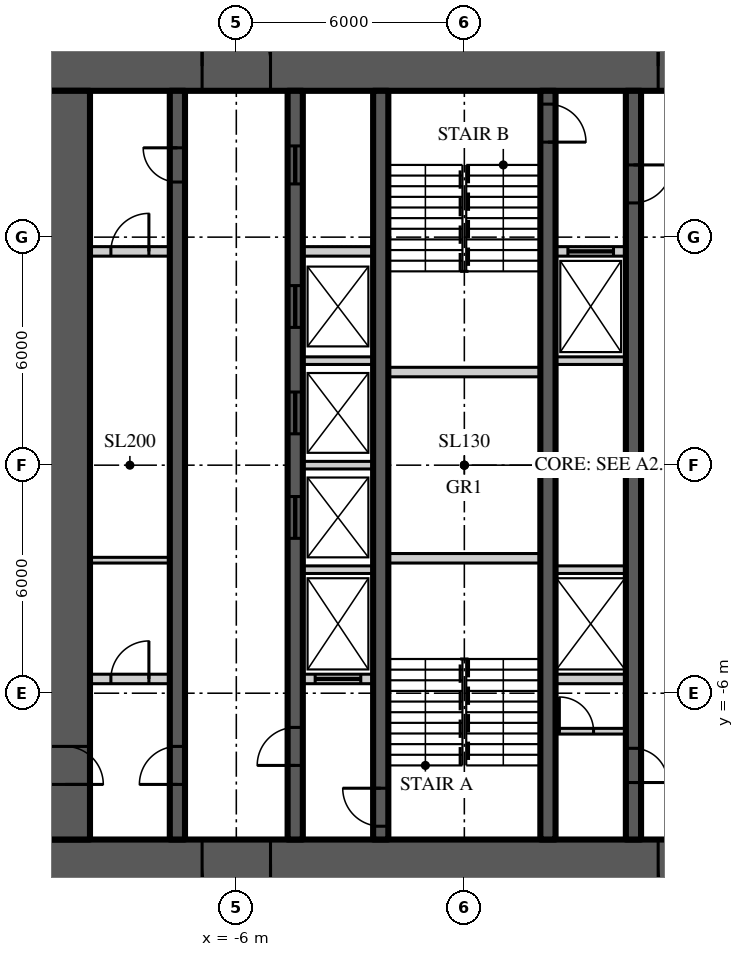
"""IFC4 building model, lengths in metres.
Left out: names, types, materials, properties, quantities, classifications, styles, units other than length and angle.
Written with IfcOpenShell. Run it as: python <this file> out.ifc"""

import sys

from ifc_helpers import new_model, si_unit, direction, frame, frame_2d, origin, place, context, subcontext, project, spatial, rectangle, extrude, element, fill, save


model = new_model("IFC4")
c1 = context("Model", 3, precision=1e-05, world=origin(), true_north=direction((0.0, 1.0)))
c2 = subcontext(c1, "Body", "Model", "MODEL_VIEW")
j1 = project(units=[si_unit("LENGTHUNIT", "METRE"), si_unit("PLANEANGLEUNIT", "RADIAN")], contexts=[c1])
p1 = place(None, origin())
s1 = spatial("IfcSite", under=j1, at=p1, CompositionType="ELEMENT")
p2 = place(p1, origin())
s2 = spatial("IfcBuilding", under=s1, at=p2, CompositionType="ELEMENT")
p3 = place(p2, frame((0.0, 0.0, 124.2)))
s3 = spatial("IfcBuildingStorey", under=s2, at=p3, CompositionType="ELEMENT", Elevation=124.2)
p4 = place(p3, frame((-11.15, 10.5, 0.0), z_axis=(0.0, 0.0, 1.0), x_axis=(1.0, 0.0, 0.0)))
e1 = element("IfcWall", 1, at=p4, inside=s3, PredefinedType="SHEAR", context=c2, shape_type="SweptSolid", body=[
    extrude(rectangle(XDim=22.3, YDim=1.3, at=frame_2d((11.15, 0.0))), origin(), (0.0, 0.0, 1.0), 3.9),
])
p5 = place(p4, frame((4.25, 0.0, 0.0)))
e2 = element("IfcOpeningElement", 2, at=p5, cuts=e1, PredefinedType="OPENING", context=c2, shape_type="SweptSolid", body=[
    extrude(rectangle(XDim=1.8, YDim=2.2, at=frame_2d((0.9, 1.1))), frame((0.0, 0.66, 0.0), z_axis=(0.0, -1.0, 0.0), x_axis=(1.0, 0.0, 0.0)), (0.0, 0.0, 1.0), 1.32),
])
p6 = place(p4, frame((16.25, 0.0, 0.0)))
e3 = element("IfcOpeningElement", 3, at=p6, cuts=e1, PredefinedType="OPENING", context=c2, shape_type="SweptSolid", body=[
    extrude(rectangle(XDim=1.8, YDim=2.2, at=frame_2d((0.9, 1.1))), frame((0.0, 0.66, 0.0), z_axis=(0.0, -1.0, 0.0), x_axis=(1.0, 0.0, 0.0)), (0.0, 0.0, 1.0), 1.32),
])
p7 = place(p3, frame((11.15, -10.5, 0.0), z_axis=(0.0, 0.0, 1.0), x_axis=(-1.0, 0.0, 0.0)))
e4 = element("IfcWall", 4, at=p7, inside=s3, PredefinedType="SHEAR", context=c2, shape_type="SweptSolid", body=[
    extrude(rectangle(XDim=22.3, YDim=1.3, at=frame_2d((11.15, 0.0))), origin(), (0.0, 0.0, 1.0), 3.9),
])
p8 = place(p7, frame((16.25, 0.0, 0.0)))
e5 = element("IfcOpeningElement", 5, at=p8, cuts=e4, PredefinedType="OPENING", context=c2, shape_type="SweptSolid", body=[
    extrude(rectangle(XDim=1.8, YDim=2.2, at=frame_2d((0.9, 1.1))), frame((0.0, 0.66, 0.0), z_axis=(0.0, -1.0, 0.0), x_axis=(1.0, 0.0, 0.0)), (0.0, 0.0, 1.0), 1.32),
])
p9 = place(p7, frame((4.25, 0.0, 0.0)))
e6 = element("IfcOpeningElement", 6, at=p9, cuts=e4, PredefinedType="OPENING", context=c2, shape_type="SweptSolid", body=[
    extrude(rectangle(XDim=1.8, YDim=2.2, at=frame_2d((0.9, 1.1))), frame((0.0, 0.66, 0.0), z_axis=(0.0, -1.0, 0.0), x_axis=(1.0, 0.0, 0.0)), (0.0, 0.0, 1.0), 1.32),
])
p10 = place(p3, frame((-10.5, 9.85, 0.0), z_axis=(0.0, 0.0, 1.0), x_axis=(0.0, -1.0, 0.0)))
e7 = element("IfcWall", 7, at=p10, inside=s3, PredefinedType="SHEAR", context=c2, shape_type="SweptSolid", body=[
    extrude(rectangle(XDim=19.7, YDim=1.3, at=frame_2d((9.85, 0.0))), origin(), (0.0, 0.0, 1.0), 3.9),
])
p11 = place(p10, frame((17.25, 0.0, 0.0)))
e8 = element("IfcOpeningElement", 8, at=p11, cuts=e7, PredefinedType="OPENING", context=c2, shape_type="SweptSolid", body=[
    extrude(rectangle(XDim=1.0, YDim=2.2, at=frame_2d((0.5, 1.1))), frame((0.0, 0.66, 0.0), z_axis=(0.0, -1.0, 0.0), x_axis=(1.0, 0.0, 0.0)), (0.0, 0.0, 1.0), 1.32),
])
p12 = place(p3, frame((-7.55, -9.85, 0.0), z_axis=(0.0, 0.0, 1.0), x_axis=(0.0, 1.0, 0.0)))
e9 = element("IfcWall", 9, at=p12, inside=s3, PredefinedType="SHEAR", context=c2, shape_type="SweptSolid", body=[
    extrude(rectangle(XDim=19.7, YDim=0.4, at=frame_2d((9.85, 0.0))), origin(), (0.0, 0.0, 1.0), 3.9),
])
p13 = place(p12, frame((1.45, 0.0, 0.0)))
e10 = element("IfcOpeningElement", 10, at=p13, cuts=e9, PredefinedType="OPENING", context=c2, shape_type="SweptSolid", body=[
    extrude(rectangle(XDim=1.0, YDim=2.2, at=frame_2d((0.5, 1.1))), frame((0.0, 0.21, 0.0), z_axis=(0.0, -1.0, 0.0), x_axis=(1.0, 0.0, 0.0)), (0.0, 0.0, 1.0), 0.42),
])
p14 = place(p12, frame((17.3, 0.0, 0.0)))
e11 = element("IfcOpeningElement", 11, at=p14, cuts=e9, PredefinedType="OPENING", context=c2, shape_type="SweptSolid", body=[
    extrude(rectangle(XDim=0.9, YDim=2.1, at=frame_2d((0.45, 1.05))), frame((0.0, 0.21, 0.0), z_axis=(0.0, -1.0, 0.0), x_axis=(1.0, 0.0, 0.0)), (0.0, 0.0, 1.0), 0.42),
])
p15 = place(p3, frame((-4.45, -9.85, 0.0), z_axis=(0.0, 0.0, 1.0), x_axis=(0.0, 1.0, 0.0)))
e12 = element("IfcWall", 12, at=p15, inside=s3, PredefinedType="SHEAR", context=c2, shape_type="SweptSolid", body=[
    extrude(rectangle(XDim=19.7, YDim=0.4, at=frame_2d((9.85, 0.0))), origin(), (0.0, 0.0, 1.0), 3.9),
])
p16 = place(p15, frame((1.95, 0.0, 0.0)))
e13 = element("IfcOpeningElement", 13, at=p16, cuts=e12, PredefinedType="OPENING", context=c2, shape_type="SweptSolid", body=[
    extrude(rectangle(XDim=1.0, YDim=2.2, at=frame_2d((0.5, 1.1))), frame((0.0, 0.21, 0.0), z_axis=(0.0, -1.0, 0.0), x_axis=(1.0, 0.0, 0.0)), (0.0, 0.0, 1.0), 0.42),
])
p17 = place(p15, frame((17.25, 0.0, 0.0)))
e14 = element("IfcOpeningElement", 14, at=p17, cuts=e12, PredefinedType="OPENING", context=c2, shape_type="SweptSolid", body=[
    extrude(rectangle(XDim=1.0, YDim=2.1, at=frame_2d((0.5, 1.05))), frame((0.0, 0.21, 0.0), z_axis=(0.0, -1.0, 0.0), x_axis=(1.0, 0.0, 0.0)), (0.0, 0.0, 1.0), 0.42),
])
p18 = place(p15, frame((7.925, 0.0, 0.0)))
e15 = element("IfcOpeningElement", 15, at=p18, cuts=e12, PredefinedType="OPENING", context=c2, shape_type="SweptSolid", body=[
    extrude(rectangle(XDim=1.1, YDim=2.2, at=frame_2d((0.55, 1.1))), frame((0.0, 0.21, 0.0), z_axis=(0.0, -1.0, 0.0), x_axis=(1.0, 0.0, 0.0)), (0.0, 0.0, 1.0), 0.42),
])
p19 = place(p15, frame((10.675, 0.0, 0.0)))
e16 = element("IfcOpeningElement", 16, at=p19, cuts=e12, PredefinedType="OPENING", context=c2, shape_type="SweptSolid", body=[
    extrude(rectangle(XDim=1.1, YDim=2.2, at=frame_2d((0.55, 1.1))), frame((0.0, 0.21, 0.0), z_axis=(0.0, -1.0, 0.0), x_axis=(1.0, 0.0, 0.0)), (0.0, 0.0, 1.0), 0.42),
])
p20 = place(p15, frame((13.475, 0.0, 0.0)))
e17 = element("IfcOpeningElement", 17, at=p20, cuts=e12, PredefinedType="OPENING", context=c2, shape_type="SweptSolid", body=[
    extrude(rectangle(XDim=1.1, YDim=2.2, at=frame_2d((0.55, 1.1))), frame((0.0, 0.21, 0.0), z_axis=(0.0, -1.0, 0.0), x_axis=(1.0, 0.0, 0.0)), (0.0, 0.0, 1.0), 0.42),
])
p21 = place(p3, frame((4.45, 9.85, 0.0), z_axis=(0.0, 0.0, 1.0), x_axis=(0.0, -1.0, 0.0)))
e18 = element("IfcWall", 18, at=p21, inside=s3, PredefinedType="SHEAR", context=c2, shape_type="SweptSolid", body=[
    extrude(rectangle(XDim=19.7, YDim=0.4, at=frame_2d((9.85, 0.0))), origin(), (0.0, 0.0, 1.0), 3.9),
])
p22 = place(p21, frame((1.95, 0.0, 0.0)))
e19 = element("IfcOpeningElement", 19, at=p22, cuts=e18, PredefinedType="OPENING", context=c2, shape_type="SweptSolid", body=[
    extrude(rectangle(XDim=1.0, YDim=2.2, at=frame_2d((0.5, 1.1))), frame((0.0, 0.21, 0.0), z_axis=(0.0, -1.0, 0.0), x_axis=(1.0, 0.0, 0.0)), (0.0, 0.0, 1.0), 0.42),
])
p23 = place(p21, frame((17.3, 0.0, 0.0)))
e20 = element("IfcOpeningElement", 20, at=p23, cuts=e18, PredefinedType="OPENING", context=c2, shape_type="SweptSolid", body=[
    extrude(rectangle(XDim=0.9, YDim=2.1, at=frame_2d((0.45, 1.05))), frame((0.0, 0.21, 0.0), z_axis=(0.0, -1.0, 0.0), x_axis=(1.0, 0.0, 0.0)), (0.0, 0.0, 1.0), 0.42),
])
p24 = place(p3, frame((-2.2, -9.85, 0.0), z_axis=(0.0, 0.0, 1.0), x_axis=(0.0, 1.0, 0.0)))
e21 = element("IfcWall", 21, at=p24, inside=s3, PredefinedType="SHEAR", context=c2, shape_type="SweptSolid", body=[
    extrude(rectangle(XDim=19.7, YDim=0.4, at=frame_2d((9.85, 0.0))), origin(), (0.0, 0.0, 1.0), 3.9),
])
p25 = place(p24, frame((0.35, 0.0, 0.0)))
e22 = element("IfcOpeningElement", 22, at=p25, cuts=e21, PredefinedType="OPENING", context=c2, shape_type="SweptSolid", body=[
    extrude(rectangle(XDim=1.0, YDim=2.2, at=frame_2d((0.5, 1.1))), frame((0.0, 0.21, 0.0), z_axis=(0.0, -1.0, 0.0), x_axis=(1.0, 0.0, 0.0)), (0.0, 0.0, 1.0), 0.42),
])
p26 = place(p3, frame((2.2, 9.85, 0.0), z_axis=(0.0, 0.0, 1.0), x_axis=(0.0, -1.0, 0.0)))
e23 = element("IfcWall", 23, at=p26, inside=s3, PredefinedType="SHEAR", context=c2, shape_type="SweptSolid", body=[
    extrude(rectangle(XDim=19.7, YDim=0.4, at=frame_2d((9.85, 0.0))), origin(), (0.0, 0.0, 1.0), 3.9),
])
p27 = place(p26, frame((0.35, 0.0, 0.0)))
e24 = element("IfcOpeningElement", 24, at=p27, cuts=e23, PredefinedType="OPENING", context=c2, shape_type="SweptSolid", body=[
    extrude(rectangle(XDim=1.0, YDim=2.2, at=frame_2d((0.5, 1.1))), frame((0.0, 0.21, 0.0), z_axis=(0.0, -1.0, 0.0), x_axis=(1.0, 0.0, 0.0)), (0.0, 0.0, 1.0), 0.42),
])
p28 = place(p3, frame((-9.85, 5.625, 0.0), z_axis=(0.0, 0.0, 1.0), x_axis=(1.0, 0.0, 0.0)))
e25 = element("IfcWall", 25, at=p28, inside=s3, PredefinedType="SOLIDWALL", context=c2, shape_type="SweptSolid", body=[
    extrude(rectangle(XDim=2.1, YDim=0.25, at=frame_2d((1.05, 0.0))), origin(), (0.0, 0.0, 1.0), 3.7),
])
p29 = place(p28, frame((0.55, 0.0, 0.0)))
e26 = element("IfcOpeningElement", 26, at=p29, cuts=e25, PredefinedType="OPENING", context=c2, shape_type="SweptSolid", body=[
    extrude(rectangle(XDim=1.0, YDim=2.2, at=frame_2d((0.5, 1.1))), frame((0.0, 0.135, 0.0), z_axis=(0.0, -1.0, 0.0), x_axis=(1.0, 0.0, 0.0)), (0.0, 0.0, 1.0), 0.27),
])
p30 = place(p3, frame((-4.25, 5.625, 0.0), z_axis=(0.0, 0.0, 1.0), x_axis=(1.0, 0.0, 0.0)))
e27 = element("IfcWall", 27, at=p30, inside=s3, PredefinedType="SOLIDWALL", context=c2, shape_type="SweptSolid", body=[
    extrude(rectangle(XDim=1.85, YDim=0.25, at=frame_2d((0.925, 0.0))), origin(), (0.0, 0.0, 1.0), 3.7),
])
p31 = place(p3, frame((2.4, 5.625, 0.0), z_axis=(0.0, 0.0, 1.0), x_axis=(1.0, 0.0, 0.0)))
e28 = element("IfcWall", 28, at=p31, inside=s3, PredefinedType="SOLIDWALL", context=c2, shape_type="SweptSolid", body=[
    extrude(rectangle(XDim=1.85, YDim=0.25, at=frame_2d((0.925, 0.0))), origin(), (0.0, 0.0, 1.0), 3.7),
])
p32 = place(p31, frame((0.325, 0.0, 0.0)))
e29 = element("IfcOpeningElement", 29, at=p32, cuts=e28, PredefinedType="OPENING", context=c2, shape_type="SweptSolid", body=[
    extrude(rectangle(XDim=1.2, YDim=2.2, at=frame_2d((0.6, 1.1))), frame((0.0, 0.135, 0.0), z_axis=(0.0, -1.0, 0.0), x_axis=(1.0, 0.0, 0.0)), (0.0, 0.0, 1.0), 0.27),
])
p33 = place(p3, frame((-9.85, -5.625, 0.0), z_axis=(0.0, 0.0, 1.0), x_axis=(1.0, 0.0, 0.0)))
e30 = element("IfcWall", 30, at=p33, inside=s3, PredefinedType="SOLIDWALL", context=c2, shape_type="SweptSolid", body=[
    extrude(rectangle(XDim=2.1, YDim=0.25, at=frame_2d((1.05, 0.0))), origin(), (0.0, 0.0, 1.0), 3.7),
])
p34 = place(p33, frame((0.55, 0.0, 0.0)))
e31 = element("IfcOpeningElement", 31, at=p34, cuts=e30, PredefinedType="OPENING", context=c2, shape_type="SweptSolid", body=[
    extrude(rectangle(XDim=1.0, YDim=2.2, at=frame_2d((0.5, 1.1))), frame((0.0, 0.135, 0.0), z_axis=(0.0, -1.0, 0.0), x_axis=(1.0, 0.0, 0.0)), (0.0, 0.0, 1.0), 0.27),
])
p35 = place(p3, frame((-4.25, -5.625, 0.0), z_axis=(0.0, 0.0, 1.0), x_axis=(1.0, 0.0, 0.0)))
e32 = element("IfcWall", 32, at=p35, inside=s3, PredefinedType="SOLIDWALL", context=c2, shape_type="SweptSolid", body=[
    extrude(rectangle(XDim=1.85, YDim=0.25, at=frame_2d((0.925, 0.0))), origin(), (0.0, 0.0, 1.0), 3.7),
])
p36 = place(p35, frame((0.325, 0.0, 0.0)))
e33 = element("IfcOpeningElement", 33, at=p36, cuts=e32, PredefinedType="OPENING", context=c2, shape_type="SweptSolid", body=[
    extrude(rectangle(XDim=1.2, YDim=2.2, at=frame_2d((0.6, 1.1))), frame((0.0, 0.135, 0.0), z_axis=(0.0, -1.0, 0.0), x_axis=(1.0, 0.0, 0.0)), (0.0, 0.0, 1.0), 0.27),
])
p37 = place(p3, frame((2.4, -5.625, 0.0), z_axis=(0.0, 0.0, 1.0), x_axis=(1.0, 0.0, 0.0)))
e34 = element("IfcWall", 34, at=p37, inside=s3, PredefinedType="SOLIDWALL", context=c2, shape_type="SweptSolid", body=[
    extrude(rectangle(XDim=1.85, YDim=0.25, at=frame_2d((0.925, 0.0))), origin(), (0.0, 0.0, 1.0), 3.7),
])
for number, where, z_axis, x_axis in (
    (35, (-2.0, -2.45, 0.0), (0.0, 0.0, 1.0), (1.0, 0.0, 0.0)),
    (36, (-2.0, 2.45, 0.0), (0.0, 0.0, 1.0), (1.0, 0.0, 0.0)),
):
    element("IfcWall", number, at=place(p3, frame(where, z_axis=z_axis, x_axis=x_axis)), inside=s3, PredefinedType="SOLIDWALL", context=c2, shape_type="SweptSolid", body=[
        extrude(rectangle(XDim=4.0, YDim=0.25, at=frame_2d((2.0, 0.0))), origin(), (0.0, 0.0, 1.0), 3.7),
    ])
for number, where, z_axis, x_axis in (
    (37, (-4.25, -2.75, 0.0), (0.0, 0.0, 1.0), (1.0, 0.0, 0.0)),
    (38, (2.4, -2.75, 0.0), (0.0, 0.0, 1.0), (1.0, 0.0, 0.0)),
    (39, (-4.25, 0.0, 0.0), (0.0, 0.0, 1.0), (1.0, 0.0, 0.0)),
    (40, (-4.25, 2.75, 0.0), (0.0, 0.0, 1.0), (1.0, 0.0, 0.0)),
    (41, (2.4, 2.75, 0.0), (0.0, 0.0, 1.0), (1.0, 0.0, 0.0)),
):
    element("IfcWall", number, at=place(p3, frame(where, z_axis=z_axis, x_axis=x_axis)), inside=s3, PredefinedType="SOLIDWALL", context=c2, shape_type="SweptSolid", body=[
        extrude(rectangle(XDim=1.85, YDim=0.2, at=frame_2d((0.925, 0.0))), origin(), (0.0, 0.0, 1.0), 3.7),
    ])
p38 = place(p3, frame((-9.85, -2.5, 0.0), z_axis=(0.0, 0.0, 1.0), x_axis=(1.0, 0.0, 0.0)))
e42 = element("IfcWall", 42, at=p38, inside=s3, PredefinedType="SOLIDWALL", context=c2, shape_type="SweptSolid", body=[
    extrude(rectangle(XDim=2.1, YDim=0.15, at=frame_2d((1.05, 0.0))), origin(), (0.0, 0.0, 1.0), 3.77),
])
p39 = place(p3, frame((2.4, -7.0, 0.0), z_axis=(0.0, 0.0, 1.0), x_axis=(1.0, 0.0, 0.0)))
e43 = element("IfcWall", 43, at=p39, inside=s3, PredefinedType="SOLIDWALL", context=c2, shape_type="SweptSolid", body=[
    extrude(rectangle(XDim=1.85, YDim=0.15, at=frame_2d((0.925, 0.0))), origin(), (0.0, 0.0, 1.0), 3.77),
])
p40 = place(p39, frame((0.1, 0.0, 0.0)))
e44 = element("IfcOpeningElement", 44, at=p40, cuts=e43, PredefinedType="OPENING", context=c2, shape_type="SweptSolid", body=[
    extrude(rectangle(XDim=0.9, YDim=2.1, at=frame_2d((0.45, 1.05))), frame((0.0, 0.085, 0.0), z_axis=(0.0, -1.0, 0.0), x_axis=(1.0, 0.0, 0.0)), (0.0, 0.0, 1.0), 0.17),
])
p41 = place(p5, origin())
e45 = element("IfcDoor", 45, at=p41, inside=s3, OperationType="DOUBLE_DOOR_DOUBLE_SWING", PredefinedType="DOOR", context=c2, shape_type="SweptSolid", body=[
    extrude(rectangle(XDim=1.8, YDim=2.2, at=frame_2d((0.9, 1.1))), frame((0.0, 0.025, 0.0), z_axis=(0.0, -1.0, 0.0), x_axis=(1.0, 0.0, 0.0)), (0.0, 0.0, 1.0), 0.05),
])
fill(e2, e45)
p42 = place(p8, origin())
e46 = element("IfcDoor", 46, at=p42, inside=s3, OperationType="DOUBLE_DOOR_DOUBLE_SWING", PredefinedType="DOOR", context=c2, shape_type="SweptSolid", body=[
    extrude(rectangle(XDim=1.8, YDim=2.2, at=frame_2d((0.9, 1.1))), frame((0.0, 0.025, 0.0), z_axis=(0.0, -1.0, 0.0), x_axis=(1.0, 0.0, 0.0)), (0.0, 0.0, 1.0), 0.05),
])
fill(e5, e46)
p43 = place(p6, origin())
e47 = element("IfcDoor", 47, at=p43, inside=s3, OperationType="DOUBLE_DOOR_DOUBLE_SWING", PredefinedType="DOOR", context=c2, shape_type="SweptSolid", body=[
    extrude(rectangle(XDim=1.8, YDim=2.2, at=frame_2d((0.9, 1.1))), frame((0.0, 0.025, 0.0), z_axis=(0.0, -1.0, 0.0), x_axis=(1.0, 0.0, 0.0)), (0.0, 0.0, 1.0), 0.05),
])
fill(e3, e47)
p44 = place(p9, origin())
e48 = element("IfcDoor", 48, at=p44, inside=s3, OperationType="DOUBLE_DOOR_DOUBLE_SWING", PredefinedType="DOOR", context=c2, shape_type="SweptSolid", body=[
    extrude(rectangle(XDim=1.8, YDim=2.2, at=frame_2d((0.9, 1.1))), frame((0.0, 0.025, 0.0), z_axis=(0.0, -1.0, 0.0), x_axis=(1.0, 0.0, 0.0)), (0.0, 0.0, 1.0), 0.05),
])
fill(e6, e48)
p45 = place(p13, origin())
e49 = element("IfcDoor", 49, at=p45, inside=s3, OperationType="SINGLE_SWING_LEFT", PredefinedType="DOOR", context=c2, shape_type="SweptSolid", body=[
    extrude(rectangle(XDim=1.0, YDim=2.2, at=frame_2d((0.5, 1.1))), frame((0.0, 0.025, 0.0), z_axis=(0.0, -1.0, 0.0), x_axis=(1.0, 0.0, 0.0)), (0.0, 0.0, 1.0), 0.05),
])
fill(e10, e49)
p46 = place(p11, origin())
e50 = element("IfcDoor", 50, at=p46, inside=s3, OperationType="SINGLE_SWING_RIGHT", PredefinedType="DOOR", context=c2, shape_type="SweptSolid", body=[
    extrude(rectangle(XDim=1.0, YDim=2.2, at=frame_2d((0.5, 1.1))), frame((0.0, 0.025, 0.0), z_axis=(0.0, -1.0, 0.0), x_axis=(1.0, 0.0, 0.0)), (0.0, 0.0, 1.0), 0.05),
])
fill(e8, e50)
p47 = place(p16, origin())
e51 = element("IfcDoor", 51, at=p47, inside=s3, OperationType="SINGLE_SWING_LEFT", PredefinedType="DOOR", context=c2, shape_type="SweptSolid", body=[
    extrude(rectangle(XDim=1.0, YDim=2.2, at=frame_2d((0.5, 1.1))), frame((0.0, 0.025, 0.0), z_axis=(0.0, -1.0, 0.0), x_axis=(1.0, 0.0, 0.0)), (0.0, 0.0, 1.0), 0.05),
])
fill(e13, e51)
p48 = place(p25, origin())
e52 = element("IfcDoor", 52, at=p48, inside=s3, OperationType="SINGLE_SWING_RIGHT", PredefinedType="DOOR", context=c2, shape_type="SweptSolid", body=[
    extrude(rectangle(XDim=1.0, YDim=2.2, at=frame_2d((0.5, 1.1))), frame((0.0, 0.025, 0.0), z_axis=(0.0, -1.0, 0.0), x_axis=(1.0, 0.0, 0.0)), (0.0, 0.0, 1.0), 0.05),
])
fill(e22, e52)
p49 = place(p22, origin())
e53 = element("IfcDoor", 53, at=p49, inside=s3, OperationType="SINGLE_SWING_LEFT", PredefinedType="DOOR", context=c2, shape_type="SweptSolid", body=[
    extrude(rectangle(XDim=1.0, YDim=2.2, at=frame_2d((0.5, 1.1))), frame((0.0, 0.025, 0.0), z_axis=(0.0, -1.0, 0.0), x_axis=(1.0, 0.0, 0.0)), (0.0, 0.0, 1.0), 0.05),
])
fill(e19, e53)
p50 = place(p27, origin())
e54 = element("IfcDoor", 54, at=p50, inside=s3, OperationType="SINGLE_SWING_RIGHT", PredefinedType="DOOR", context=c2, shape_type="SweptSolid", body=[
    extrude(rectangle(XDim=1.0, YDim=2.2, at=frame_2d((0.5, 1.1))), frame((0.0, 0.025, 0.0), z_axis=(0.0, -1.0, 0.0), x_axis=(1.0, 0.0, 0.0)), (0.0, 0.0, 1.0), 0.05),
])
fill(e24, e54)
p51 = place(p14, origin())
e55 = element("IfcDoor", 55, at=p51, inside=s3, OperationType="SINGLE_SWING_RIGHT", PredefinedType="DOOR", context=c2, shape_type="SweptSolid", body=[
    extrude(rectangle(XDim=0.9, YDim=2.1, at=frame_2d((0.45, 1.05))), frame((0.0, 0.025, 0.0), z_axis=(0.0, -1.0, 0.0), x_axis=(1.0, 0.0, 0.0)), (0.0, 0.0, 1.0), 0.05),
])
fill(e11, e55)
p52 = place(p17, origin())
e56 = element("IfcDoor", 56, at=p52, inside=s3, OperationType="SLIDING_TO_LEFT", PredefinedType="DOOR", context=c2, shape_type="SweptSolid", body=[
    extrude(rectangle(XDim=1.0, YDim=2.1, at=frame_2d((0.5, 1.05))), frame((0.0, 0.025, 0.0), z_axis=(0.0, -1.0, 0.0), x_axis=(1.0, 0.0, 0.0)), (0.0, 0.0, 1.0), 0.05),
])
fill(e14, e56)
p53 = place(p23, origin())
e57 = element("IfcDoor", 57, at=p53, inside=s3, OperationType="SINGLE_SWING_RIGHT", PredefinedType="DOOR", context=c2, shape_type="SweptSolid", body=[
    extrude(rectangle(XDim=0.9, YDim=2.1, at=frame_2d((0.45, 1.05))), frame((0.0, 0.025, 0.0), z_axis=(0.0, -1.0, 0.0), x_axis=(1.0, 0.0, 0.0)), (0.0, 0.0, 1.0), 0.05),
])
fill(e20, e57)
p54 = place(p18, origin())
e58 = element("IfcDoor", 58, at=p54, inside=s3, OperationType="SLIDING_TO_LEFT", PredefinedType="DOOR", context=c2, shape_type="SweptSolid", body=[
    extrude(rectangle(XDim=1.1, YDim=2.2, at=frame_2d((0.55, 1.1))), frame((0.0, 0.025, 0.0), z_axis=(0.0, -1.0, 0.0), x_axis=(1.0, 0.0, 0.0)), (0.0, 0.0, 1.0), 0.05),
])
fill(e15, e58)
p55 = place(p19, origin())
e59 = element("IfcDoor", 59, at=p55, inside=s3, OperationType="SLIDING_TO_LEFT", PredefinedType="DOOR", context=c2, shape_type="SweptSolid", body=[
    extrude(rectangle(XDim=1.1, YDim=2.2, at=frame_2d((0.55, 1.1))), frame((0.0, 0.025, 0.0), z_axis=(0.0, -1.0, 0.0), x_axis=(1.0, 0.0, 0.0)), (0.0, 0.0, 1.0), 0.05),
])
fill(e16, e59)
p56 = place(p20, origin())
e60 = element("IfcDoor", 60, at=p56, inside=s3, OperationType="SLIDING_TO_LEFT", PredefinedType="DOOR", context=c2, shape_type="SweptSolid", body=[
    extrude(rectangle(XDim=1.1, YDim=2.2, at=frame_2d((0.55, 1.1))), frame((0.0, 0.025, 0.0), z_axis=(0.0, -1.0, 0.0), x_axis=(1.0, 0.0, 0.0)), (0.0, 0.0, 1.0), 0.05),
])
fill(e17, e60)
p57 = place(p36, origin())
e61 = element("IfcDoor", 61, at=p57, inside=s3, OperationType="SLIDING_TO_LEFT", PredefinedType="DOOR", context=c2, shape_type="SweptSolid", body=[
    extrude(rectangle(XDim=1.2, YDim=2.2, at=frame_2d((0.6, 1.1))), frame((0.0, 0.025, 0.0), z_axis=(0.0, -1.0, 0.0), x_axis=(1.0, 0.0, 0.0)), (0.0, 0.0, 1.0), 0.05),
])
fill(e33, e61)
p58 = place(p32, origin())
e62 = element("IfcDoor", 62, at=p58, inside=s3, OperationType="SLIDING_TO_LEFT", PredefinedType="DOOR", context=c2, shape_type="SweptSolid", body=[
    extrude(rectangle(XDim=1.2, YDim=2.2, at=frame_2d((0.6, 1.1))), frame((0.0, 0.025, 0.0), z_axis=(0.0, -1.0, 0.0), x_axis=(1.0, 0.0, 0.0)), (0.0, 0.0, 1.0), 0.05),
])
fill(e29, e62)
p59 = place(p29, origin())
e63 = element("IfcDoor", 63, at=p59, inside=s3, OperationType="SINGLE_SWING_RIGHT", PredefinedType="DOOR", context=c2, shape_type="SweptSolid", body=[
    extrude(rectangle(XDim=1.0, YDim=2.2, at=frame_2d((0.5, 1.1))), frame((0.0, 0.025, 0.0), z_axis=(0.0, -1.0, 0.0), x_axis=(1.0, 0.0, 0.0)), (0.0, 0.0, 1.0), 0.05),
])
fill(e26, e63)
p60 = place(p34, origin())
e64 = element("IfcDoor", 64, at=p60, inside=s3, OperationType="SINGLE_SWING_RIGHT", PredefinedType="DOOR", context=c2, shape_type="SweptSolid", body=[
    extrude(rectangle(XDim=1.0, YDim=2.2, at=frame_2d((0.5, 1.1))), frame((0.0, 0.025, 0.0), z_axis=(0.0, -1.0, 0.0), x_axis=(1.0, 0.0, 0.0)), (0.0, 0.0, 1.0), 0.05),
])
fill(e31, e64)
p61 = place(p40, origin())
e65 = element("IfcDoor", 65, at=p61, inside=s3, OperationType="SINGLE_SWING_LEFT", PredefinedType="DOOR", context=c2, shape_type="SweptSolid", body=[
    extrude(rectangle(XDim=0.9, YDim=2.1, at=frame_2d((0.45, 1.05))), frame((0.0, 0.025, 0.0), z_axis=(0.0, -1.0, 0.0), x_axis=(1.0, 0.0, 0.0)), (0.0, 0.0, 1.0), 0.05),
])
fill(e44, e65)
save(model, sys.argv[1])
